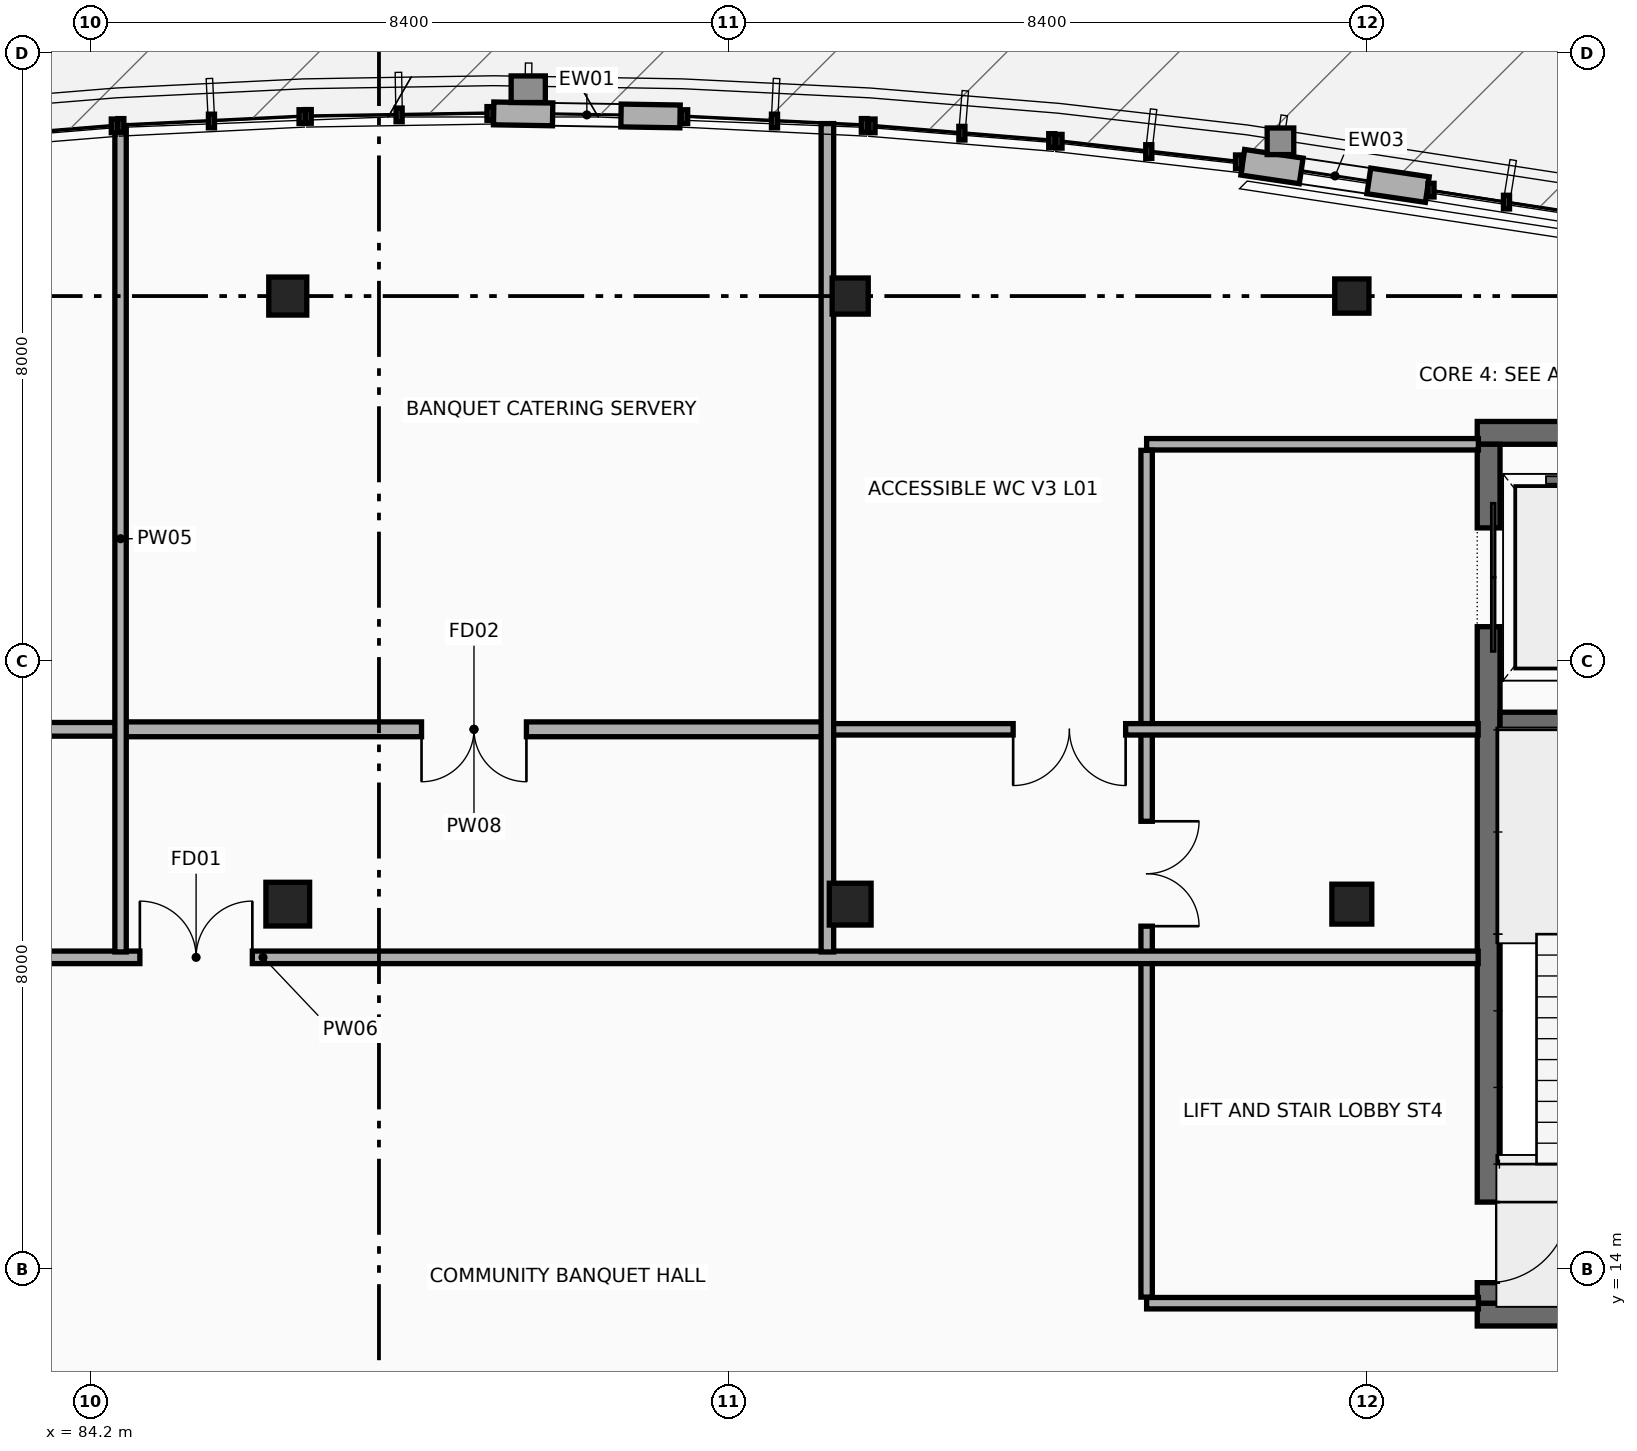
"""IFC4 building model, lengths in metres.
Left out: names, types, materials, properties, quantities, classifications, styles, units other than length and angle.
Written with IfcOpenShell. Run it as: python <this file> out.ifc"""

import sys

from ifc_helpers import new_model, si_unit, direction, frame, frame_2d, origin, origin_2d, place, context, subcontext, project, spatial, rectangle, extrude, element, fill, save


model = new_model("IFC4")
c1 = context("Model", 3, precision=1e-05, world=origin(), true_north=direction((0.0, 1.0)))
c2 = subcontext(c1, "Body", "Model", "MODEL_VIEW")
j1 = project(units=[si_unit("LENGTHUNIT", "METRE"), si_unit("PLANEANGLEUNIT", "RADIAN")], contexts=[c1])
p1 = place(None, origin())
s1 = spatial("IfcSite", under=j1, at=p1, CompositionType="ELEMENT")
p2 = place(p1, origin())
s2 = spatial("IfcBuilding", under=s1, at=p2, CompositionType="ELEMENT")
p3 = place(p2, frame((0.0, 0.0, 4.8)))
s3 = spatial("IfcBuildingStorey", under=s2, at=p3, CompositionType="ELEMENT", Elevation=4.8)
p4 = place(p3, frame((102.45, 13.4, 0.0), z_axis=(0.0, 0.0, 1.0), x_axis=(1.0, 0.0, 0.0)))
e1 = element("IfcWall", 1, at=p4, inside=s3, PredefinedType="SHEAR", context=c2, shape_type="SweptSolid", body=[
    extrude(rectangle(XDim=5.653, YDim=0.3, at=frame_2d((2.827, 0.0))), origin(), (0.0, 0.0, 1.0), 3.9),
])
p5 = place(p3, frame((107.323, 25.0, 0.0), z_axis=(0.0, 0.0, 1.0), x_axis=(-1.0, 0.0, 0.0)))
e2 = element("IfcWall", 2, at=p5, inside=s3, PredefinedType="SHEAR", context=c2, shape_type="SweptSolid", body=[
    extrude(rectangle(XDim=4.873, YDim=0.3, at=frame_2d((2.437, 0.0))), origin(), (0.0, 0.0, 1.0), 3.9),
])
p6 = place(p3, frame((102.6, 24.85, 0.0), z_axis=(0.0, 0.0, 1.0), x_axis=(0.0, -1.0, 0.0)))
e3 = element("IfcWall", 3, at=p6, inside=s3, PredefinedType="SHEAR", context=c2, shape_type="SweptSolid", body=[
    extrude(rectangle(XDim=11.3, YDim=0.3, at=frame_2d((5.65, 0.0))), origin(), (0.0, 0.0, 1.0), 3.9),
])
p7 = place(p6, frame((1.1, 0.0, 0.0)))
e4 = element("IfcOpeningElement", 4, at=p7, cuts=e3, PredefinedType="OPENING", context=c2, shape_type="SweptSolid", body=[
    extrude(rectangle(XDim=1.3, YDim=2.25, at=frame_2d((0.65, 1.125))), frame((0.0, 0.16, 0.0), z_axis=(0.0, -1.0, 0.0), x_axis=(1.0, 0.0, 0.0)), (0.0, 0.0, 1.0), 0.32),
])
p8 = place(p6, frame((9.97, 0.0, 0.0)))
e5 = element("IfcOpeningElement", 5, at=p8, cuts=e3, PredefinedType="OPENING", context=c2, shape_type="SweptSolid", body=[
    extrude(rectangle(XDim=1.06, YDim=2.15, at=frame_2d((0.53, 1.075))), frame((0.0, 0.16, 0.0), z_axis=(0.0, -1.0, 0.0), x_axis=(1.0, 0.0, 0.0)), (0.0, 0.0, 1.0), 0.32),
])
p9 = place(p3, frame((102.75, 21.2, 0.0), z_axis=(0.0, 0.0, 1.0), x_axis=(1.0, 0.0, 0.0)))
e6 = element("IfcWall", 6, at=p9, inside=s3, PredefinedType="SHEAR", context=c2, shape_type="SweptSolid", body=[
    extrude(rectangle(XDim=4.1, YDim=0.25, at=frame_2d((2.05, 0.0))), origin(), (0.0, 0.0, 1.0), 3.9),
])
p10 = place(p3, frame((86.8, 18.8, 0.0), z_axis=(0.0, 0.0, 1.0), x_axis=(1.0, 0.0, 0.0)))
e7 = element("IfcColumn", 7, at=p10, inside=s3, PredefinedType="COLUMN", context=c2, shape_type="SweptSolid", body=[
    extrude(rectangle(XDim=0.575, YDim=0.575, at=origin_2d()), origin(), (0.0, 0.0, 1.0), 3.9),
])
p11 = place(p3, frame((86.8, 26.8, 0.0), z_axis=(0.0, 0.0, 1.0), x_axis=(1.0, 0.0, 0.0)))
e8 = element("IfcColumn", 8, at=p11, inside=s3, PredefinedType="COLUMN", context=c2, shape_type="SweptSolid", body=[
    extrude(rectangle(XDim=0.5, YDim=0.5, at=origin_2d()), origin(), (0.0, 0.0, 1.0), 3.9),
])
p12 = place(p3, frame((94.2, 18.8, 0.0), z_axis=(0.0, 0.0, 1.0), x_axis=(1.0, 0.0, 0.0)))
e9 = element("IfcColumn", 9, at=p12, inside=s3, PredefinedType="COLUMN", context=c2, shape_type="SweptSolid", body=[
    extrude(rectangle(XDim=0.55, YDim=0.55, at=origin_2d()), origin(), (0.0, 0.0, 1.0), 3.9),
])
p13 = place(p3, frame((94.2, 26.8, 0.0), z_axis=(0.0, 0.0, 1.0), x_axis=(1.0, 0.0, 0.0)))
e10 = element("IfcColumn", 10, at=p13, inside=s3, PredefinedType="COLUMN", context=c2, shape_type="SweptSolid", body=[
    extrude(rectangle(XDim=0.475, YDim=0.475, at=origin_2d()), origin(), (0.0, 0.0, 1.0), 3.9),
])
p14 = place(p3, frame((100.8, 18.8, 0.0), z_axis=(0.0, 0.0, 1.0), x_axis=(1.0, 0.0, 0.0)))
e11 = element("IfcColumn", 11, at=p14, inside=s3, PredefinedType="COLUMN", context=c2, shape_type="SweptSolid", body=[
    extrude(rectangle(XDim=0.525, YDim=0.525, at=origin_2d()), origin(), (0.0, 0.0, 1.0), 3.9),
])
p15 = place(p3, frame((100.8, 26.8, 0.0), z_axis=(0.0, 0.0, 1.0), x_axis=(1.0, 0.0, 0.0)))
e12 = element("IfcColumn", 12, at=p15, inside=s3, PredefinedType="COLUMN", context=c2, shape_type="SweptSolid", body=[
    extrude(rectangle(XDim=0.45, YDim=0.45, at=origin_2d()), origin(), (0.0, 0.0, 1.0), 3.9),
])
p16 = place(p3, frame((99.365, 28.56, 0.0), z_axis=(0.0, 0.0, 1.0), x_axis=(0.98923708278, -0.146321543365, 0.0)))
e13 = element("IfcWall", 13, at=p16, inside=s3, PredefinedType="STANDARD", context=c2, shape_type="SweptSolid", body=[
    extrude(rectangle(XDim=2.454, YDim=0.34, at=frame_2d((1.227, 0.0))), origin(), (0.0, 0.0, 1.0), 3.612),
])
p17 = place(p16, frame((0.777, 0.0, 0.9)))
e14 = element("IfcOpeningElement", 14, at=p17, cuts=e13, PredefinedType="OPENING", context=c2, shape_type="SweptSolid", body=[
    extrude(rectangle(XDim=0.9, YDim=1.2, at=frame_2d((0.45, 0.6))), frame((0.0, 0.18, 0.0), z_axis=(0.0, -1.0, 0.0), x_axis=(1.0, 0.0, 0.0)), (0.0, 0.0, 1.0), 0.36),
])
p18 = place(p3, frame((89.509, 29.203, 0.0), z_axis=(0.0, 0.0, 1.0), x_axis=(0.999868316156, -0.01622807284, 0.0)))
e15 = element("IfcWall", 15, at=p18, inside=s3, PredefinedType="STANDARD", context=c2, shape_type="SweptSolid", body=[
    extrude(rectangle(XDim=2.452, YDim=0.3, at=frame_2d((1.226, 0.0))), origin(), (0.0, 0.0, 1.0), 3.612),
])
p19 = place(p18, frame((0.776, 0.0, 0.9)))
e16 = element("IfcOpeningElement", 16, at=p19, cuts=e15, PredefinedType="OPENING", context=c2, shape_type="SweptSolid", body=[
    extrude(rectangle(XDim=0.9, YDim=1.2, at=frame_2d((0.45, 0.6))), frame((0.0, 0.16, 0.0), z_axis=(0.0, -1.0, 0.0), x_axis=(1.0, 0.0, 0.0)), (0.0, 0.0, 1.0), 0.32),
])
p20 = place(p3, frame((98.1, 13.55, 0.0), z_axis=(0.0, 0.0, 1.0), x_axis=(1.0, 0.0, 0.0)))
e17 = element("IfcWall", 17, at=p20, inside=s3, PredefinedType="PARTITIONING", context=c2, shape_type="SweptSolid", body=[
    extrude(rectangle(XDim=4.365, YDim=0.15, at=frame_2d((2.183, 0.0))), origin(), (0.0, 0.0, 1.0), 3.045),
])
p21 = place(p3, frame((102.465, 24.85, 0.0), z_axis=(0.0, 0.0, 1.0), x_axis=(-1.0, 0.0, 0.0)))
e18 = element("IfcWall", 18, at=p21, inside=s3, PredefinedType="PARTITIONING", context=c2, shape_type="SweptSolid", body=[
    extrude(rectangle(XDim=4.365, YDim=0.15, at=frame_2d((2.183, 0.0))), origin(), (0.0, 0.0, 1.0), 2.995),
])
p22 = place(p3, frame((98.1, 24.77, 0.0), z_axis=(0.0, 0.0, 1.0), x_axis=(0.0, -1.0, 0.0)))
e19 = element("IfcWall", 19, at=p22, inside=s3, PredefinedType="PARTITIONING", context=c2, shape_type="SweptSolid", body=[
    extrude(rectangle(XDim=11.14, YDim=0.15, at=frame_2d((5.57, 0.0))), origin(), (0.0, 0.0, 1.0), 3.232),
])
p23 = place(p22, frame((4.88, 0.0, 0.0)))
e20 = element("IfcOpeningElement", 20, at=p23, cuts=e19, PredefinedType="OPENING", context=c2, shape_type="SweptSolid", body=[
    extrude(rectangle(XDim=1.38, YDim=2.2, at=frame_2d((0.69, 1.1))), frame((0.0, 0.085, 0.0), z_axis=(0.0, -1.0, 0.0), x_axis=(1.0, 0.0, 0.0)), (0.0, 0.0, 1.0), 0.17),
])
p24 = place(p3, frame((70.486, 18.1, 0.0), z_axis=(0.0, 0.0, 1.0), x_axis=(1.0, 0.0, 0.0)))
e21 = element("IfcWall", 21, at=p24, inside=s3, PredefinedType="PARTITIONING", context=c2, shape_type="SweptSolid", body=[
    extrude(rectangle(XDim=31.976, YDim=0.165, at=frame_2d((15.988, 0.0))), origin(), (0.0, 0.0, 1.0), 3.045),
])
p25 = place(p24, frame((14.368, 0.0, 0.0)))
e22 = element("IfcOpeningElement", 22, at=p25, cuts=e21, PredefinedType="OPENING", context=c2, shape_type="SweptSolid", body=[
    extrude(rectangle(XDim=1.48, YDim=2.22, at=frame_2d((0.74, 1.11))), frame((0.0, 0.093, 0.0), z_axis=(0.0, -1.0, 0.0), x_axis=(1.0, 0.0, 0.0)), (0.0, 0.0, 1.0), 0.185),
])
p26 = place(p3, frame((84.6, 21.1, 0.0), z_axis=(0.0, 0.0, 1.0), x_axis=(-1.0, 0.0, 0.0)))
e23 = element("IfcWall", 23, at=p26, inside=s3, PredefinedType="PARTITIONING", context=c2, shape_type="SweptSolid", body=[
    extrude(rectangle(XDim=14.207, YDim=0.18, at=frame_2d((7.104, 0.0))), origin(), (0.0, 0.0, 1.0), 3.095),
])
p27 = place(p26, frame((6.633, 0.0, 0.0)))
e24 = element("IfcOpeningElement", 24, at=p27, cuts=e23, PredefinedType="OPENING", context=c2, shape_type="SweptSolid", body=[
    extrude(rectangle(XDim=0.94, YDim=2.1, at=frame_2d((0.47, 1.05))), frame((0.0, 0.1, 0.0), z_axis=(0.0, -1.0, 0.0), x_axis=(1.0, 0.0, 0.0)), (0.0, 0.0, 1.0), 0.2),
])
p28 = place(p3, frame((93.9, 21.1, 0.0), z_axis=(0.0, 0.0, 1.0), x_axis=(-1.0, 0.0, 0.0)))
e25 = element("IfcWall", 25, at=p28, inside=s3, PredefinedType="PARTITIONING", context=c2, shape_type="SweptSolid", body=[
    extrude(rectangle(XDim=9.3, YDim=0.195, at=frame_2d((4.65, 0.0))), origin(), (0.0, 0.0, 1.0), 3.07),
])
p29 = place(p28, frame((3.96, 0.0, 0.0)))
e26 = element("IfcOpeningElement", 26, at=p29, cuts=e25, PredefinedType="OPENING", context=c2, shape_type="SweptSolid", body=[
    extrude(rectangle(XDim=1.38, YDim=2.2, at=frame_2d((0.69, 1.1))), frame((0.0, 0.107, 0.0), z_axis=(0.0, -1.0, 0.0), x_axis=(1.0, 0.0, 0.0)), (0.0, 0.0, 1.0), 0.215),
])
p30 = place(p3, frame((102.462, 21.1, 0.0), z_axis=(0.0, 0.0, 1.0), x_axis=(-1.0, 0.0, 0.0)))
e27 = element("IfcWall", 27, at=p30, inside=s3, PredefinedType="PARTITIONING", context=c2, shape_type="SweptSolid", body=[
    extrude(rectangle(XDim=8.562, YDim=0.15, at=frame_2d((4.281, 0.0))), origin(), (0.0, 0.0, 1.0), 2.995),
])
p31 = place(p30, frame((4.638, 0.0, 0.0)))
e28 = element("IfcOpeningElement", 28, at=p31, cuts=e27, PredefinedType="OPENING", context=c2, shape_type="SweptSolid", body=[
    extrude(rectangle(XDim=1.48, YDim=2.22, at=frame_2d((0.74, 1.11))), frame((0.0, 0.085, 0.0), z_axis=(0.0, -1.0, 0.0), x_axis=(1.0, 0.0, 0.0)), (0.0, 0.0, 1.0), 0.17),
])
p32 = place(p3, frame((84.6, 18.171, 0.0), z_axis=(0.0, 0.0, 1.0), x_axis=(0.0, 1.0, 0.0)))
e29 = element("IfcWall", 29, at=p32, inside=s3, PredefinedType="PARTITIONING", context=c2, shape_type="SweptSolid", body=[
    extrude(rectangle(XDim=10.873, YDim=0.15, at=frame_2d((5.437, 0.0))), origin(), (0.0, 0.0, 1.0), 3.236),
])
p33 = place(p3, frame((93.9, 18.171, 0.0), z_axis=(0.0, 0.0, 1.0), x_axis=(0.0, 1.0, 0.0)))
e30 = element("IfcWall", 30, at=p33, inside=s3, PredefinedType="PARTITIONING", context=c2, shape_type="SweptSolid", body=[
    extrude(rectangle(XDim=10.898, YDim=0.165, at=frame_2d((5.449, 0.0))), origin(), (0.0, 0.0, 1.0), 3.045),
])
p34 = place(p17, origin())
e31 = element("IfcWindow", 31, at=p34, inside=s3, PartitioningType="SINGLE_PANEL", PredefinedType="WINDOW", context=c2, shape_type="SweptSolid", body=[
    extrude(rectangle(XDim=0.9, YDim=1.2, at=frame_2d((0.45, 0.6))), frame((0.0, 0.03, 0.0), z_axis=(0.0, -1.0, 0.0), x_axis=(1.0, 0.0, 0.0)), (0.0, 0.0, 1.0), 0.06),
])
fill(e14, e31)
p35 = place(p19, origin())
e32 = element("IfcWindow", 32, at=p35, inside=s3, PartitioningType="SINGLE_PANEL", PredefinedType="WINDOW", context=c2, shape_type="SweptSolid", body=[
    extrude(rectangle(XDim=0.9, YDim=1.2, at=frame_2d((0.45, 0.6))), frame((0.0, 0.03, 0.0), z_axis=(0.0, -1.0, 0.0), x_axis=(1.0, 0.0, 0.0)), (0.0, 0.0, 1.0), 0.06),
])
fill(e16, e32)
p36 = place(p7, origin())
e33 = element("IfcDoor", 33, at=p36, inside=s3, OperationType="DOUBLE_DOOR_SLIDING", PredefinedType="DOOR", context=c2, shape_type="SweptSolid", body=[
    extrude(rectangle(XDim=1.3, YDim=2.25, at=frame_2d((0.65, 1.125))), frame((0.0, 0.025, 0.0), z_axis=(0.0, -1.0, 0.0), x_axis=(1.0, 0.0, 0.0)), (0.0, 0.0, 1.0), 0.05),
])
fill(e4, e33)
p37 = place(p8, origin())
e34 = element("IfcDoor", 34, at=p37, inside=s3, OperationType="SINGLE_SWING_LEFT", PredefinedType="DOOR", context=c2, shape_type="SweptSolid", body=[
    extrude(rectangle(XDim=1.06, YDim=2.15, at=frame_2d((0.53, 1.075))), frame((0.0, 0.025, 0.0), z_axis=(0.0, -1.0, 0.0), x_axis=(1.0, 0.0, 0.0)), (0.0, 0.0, 1.0), 0.05),
])
fill(e5, e34)
p38 = place(p23, origin())
e35 = element("IfcDoor", 35, at=p38, inside=s3, OperationType="DOUBLE_DOOR_SINGLE_SWING", PredefinedType="DOOR", context=c2, shape_type="SweptSolid", body=[
    extrude(rectangle(XDim=1.38, YDim=2.2, at=frame_2d((0.69, 1.1))), frame((0.0, 0.025, 0.0), z_axis=(0.0, -1.0, 0.0), x_axis=(1.0, 0.0, 0.0)), (0.0, 0.0, 1.0), 0.05),
])
fill(e20, e35)
p39 = place(p25, origin())
e36 = element("IfcDoor", 36, at=p39, inside=s3, OperationType="DOUBLE_DOOR_SINGLE_SWING", PredefinedType="DOOR", context=c2, shape_type="SweptSolid", body=[
    extrude(rectangle(XDim=1.48, YDim=2.22, at=frame_2d((0.74, 1.11))), frame((0.0, 0.025, 0.0), z_axis=(0.0, -1.0, 0.0), x_axis=(1.0, 0.0, 0.0)), (0.0, 0.0, 1.0), 0.05),
])
fill(e22, e36)
p40 = place(p29, origin())
e37 = element("IfcDoor", 37, at=p40, inside=s3, OperationType="DOUBLE_DOOR_SINGLE_SWING", PredefinedType="DOOR", context=c2, shape_type="SweptSolid", body=[
    extrude(rectangle(XDim=1.38, YDim=2.2, at=frame_2d((0.69, 1.1))), frame((0.0, 0.025, 0.0), z_axis=(0.0, -1.0, 0.0), x_axis=(1.0, 0.0, 0.0)), (0.0, 0.0, 1.0), 0.05),
])
fill(e26, e37)
p41 = place(p31, origin())
e38 = element("IfcDoor", 38, at=p41, inside=s3, OperationType="DOUBLE_DOOR_SINGLE_SWING", PredefinedType="DOOR", context=c2, shape_type="SweptSolid", body=[
    extrude(rectangle(XDim=1.48, YDim=2.22, at=frame_2d((0.74, 1.11))), frame((0.0, 0.025, 0.0), z_axis=(0.0, -1.0, 0.0), x_axis=(1.0, 0.0, 0.0)), (0.0, 0.0, 1.0), 0.05),
])
fill(e28, e38)
save(model, sys.argv[1])
